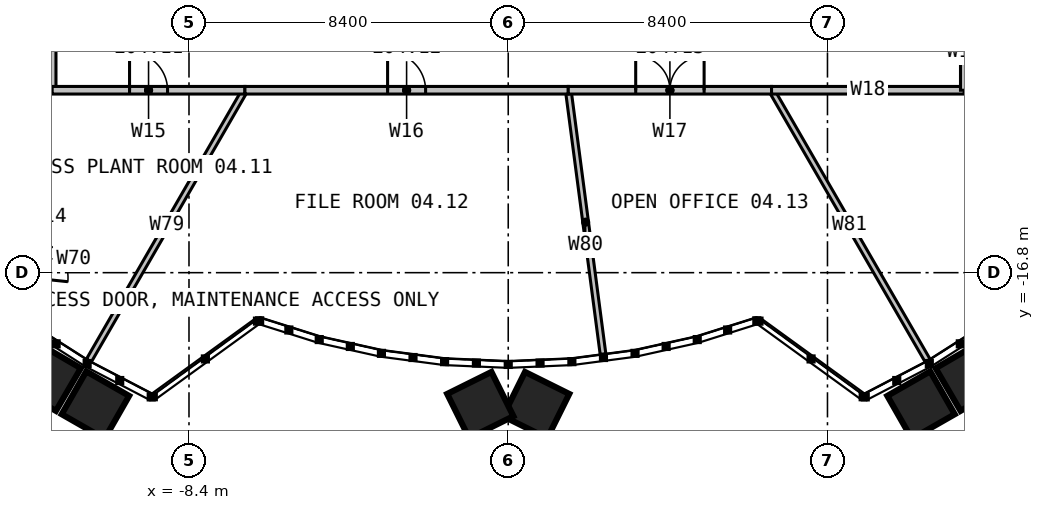
"""IFC4 building model, lengths in metres.
Left out: names, types, materials, properties, quantities, classifications, styles, units other than length and angle.
Written with IfcOpenShell. Run it as: python <this file> out.ifc"""

import sys

from ifc_helpers import new_model, si_unit, direction, frame, frame_2d, origin, place, context, subcontext, project, spatial, rectangle, extrude, element, fill, save


model = new_model("IFC4")
c1 = context("Model", 3, precision=1e-05, world=origin(), true_north=direction((0.0, 1.0)))
c2 = subcontext(c1, "Body", "Model", "MODEL_VIEW")
j1 = project(units=[si_unit("LENGTHUNIT", "METRE"), si_unit("PLANEANGLEUNIT", "RADIAN")], contexts=[c1])
p1 = place(None, origin())
s1 = spatial("IfcSite", under=j1, at=p1, CompositionType="ELEMENT")
p2 = place(p1, origin())
s2 = spatial("IfcBuilding", under=s1, at=p2, CompositionType="ELEMENT")
p3 = place(p2, frame((0.0, 0.0, 21.0)))
s3 = spatial("IfcBuildingStorey", under=s2, at=p3, CompositionType="ELEMENT", Elevation=21.0)
p4 = place(p3, frame((-12.0, -9.208, 0.0), z_axis=(0.0, 0.0, 1.0), x_axis=(-0.7933554916, -0.608758625359, 0.0)))
e1 = element("IfcWall", 1, at=p4, inside=s3, PredefinedType="PARTITIONING", context=c2, shape_type="SweptSolid", body=[
    extrude(rectangle(XDim=3.979, YDim=0.15, at=frame_2d((1.99, 0.0))), origin(), (0.0, 0.0, 1.0), 2.79),
])
p5 = place(p3, frame((-6.928, -12.0, 0.0), z_axis=(0.0, 0.0, 1.0), x_axis=(-0.499995243048, -0.866028150195, 0.0)))
e2 = element("IfcWall", 2, at=p5, inside=s3, PredefinedType="PARTITIONING", context=c2, shape_type="SweptSolid", body=[
    extrude(rectangle(XDim=8.212, YDim=0.15, at=frame_2d((4.106, 0.0))), origin(), (0.0, 0.0, 1.0), 2.79),
])
p6 = place(p3, frame((1.58, -12.0, 0.0), z_axis=(0.0, 0.0, 1.0), x_axis=(0.130512238579, -0.991446698306, 0.0)))
e3 = element("IfcWall", 3, at=p6, inside=s3, PredefinedType="PARTITIONING", context=c2, shape_type="SweptSolid", body=[
    extrude(rectangle(XDim=7.002, YDim=0.15, at=frame_2d((3.501, 0.0))), origin(), (0.0, 0.0, 1.0), 2.79),
])
p7 = place(p3, frame((6.928, -12.0, 0.0), z_axis=(0.0, 0.0, 1.0), x_axis=(0.499995243048, -0.866028150195, 0.0)))
e4 = element("IfcWall", 4, at=p7, inside=s3, PredefinedType="PARTITIONING", context=c2, shape_type="SweptSolid", body=[
    extrude(rectangle(XDim=8.212, YDim=0.15, at=frame_2d((4.106, 0.0))), origin(), (0.0, 0.0, 1.0), 2.79),
])
p8 = place(p3, frame((-12.0, -9.208, 0.0), z_axis=(0.0, 0.0, 1.0), x_axis=(0.0, -1.0, 0.0)))
e5 = element("IfcWall", 5, at=p8, inside=s3, PredefinedType="PARTITIONING", context=c2, shape_type="SweptSolid", body=[
    extrude(rectangle(XDim=2.792, YDim=0.2, at=frame_2d((1.396, 0.0))), origin(), (0.0, 0.0, 1.0), 3.8),
])
p9 = place(p3, frame((-12.0, -12.0, 0.0), z_axis=(0.0, 0.0, 1.0), x_axis=(1.0, 0.0, 0.0)))
e6 = element("IfcWall", 6, at=p9, inside=s3, PredefinedType="PARTITIONING", context=c2, shape_type="SweptSolid", body=[
    extrude(rectangle(XDim=5.072, YDim=0.2, at=frame_2d((2.536, 0.0))), origin(), (0.0, 0.0, 1.0), 3.8),
])
p10 = place(p9, frame((2.036, 0.0, 0.0)))
e7 = element("IfcOpeningElement", 7, at=p10, cuts=e6, PredefinedType="OPENING", context=c2, shape_type="SweptSolid", body=[
    extrude(rectangle(XDim=1.0, YDim=2.2, at=frame_2d((0.5, 1.1))), frame((0.0, 0.11, 0.0), z_axis=(0.0, -1.0, 0.0), x_axis=(1.0, 0.0, 0.0)), (0.0, 0.0, 1.0), 0.22),
])
p11 = place(p3, frame((-6.928, -12.0, 0.0), z_axis=(0.0, 0.0, 1.0), x_axis=(1.0, 0.0, 0.0)))
e8 = element("IfcWall", 8, at=p11, inside=s3, PredefinedType="PARTITIONING", context=c2, shape_type="SweptSolid", body=[
    extrude(rectangle(XDim=8.508, YDim=0.2, at=frame_2d((4.254, 0.0))), origin(), (0.0, 0.0, 1.0), 3.8),
])
p12 = place(p11, frame((3.754, 0.0, 0.0)))
e9 = element("IfcOpeningElement", 9, at=p12, cuts=e8, PredefinedType="OPENING", context=c2, shape_type="SweptSolid", body=[
    extrude(rectangle(XDim=1.0, YDim=2.2, at=frame_2d((0.5, 1.1))), frame((0.0, 0.11, 0.0), z_axis=(0.0, -1.0, 0.0), x_axis=(1.0, 0.0, 0.0)), (0.0, 0.0, 1.0), 0.22),
])
p13 = place(p3, frame((1.58, -12.0, 0.0), z_axis=(0.0, 0.0, 1.0), x_axis=(1.0, 0.0, 0.0)))
e10 = element("IfcWall", 10, at=p13, inside=s3, PredefinedType="PARTITIONING", context=c2, shape_type="SweptSolid", body=[
    extrude(rectangle(XDim=5.348, YDim=0.2, at=frame_2d((2.674, 0.0))), origin(), (0.0, 0.0, 1.0), 3.8),
])
p14 = place(p13, frame((1.774, 0.0, 0.0)))
e11 = element("IfcOpeningElement", 11, at=p14, cuts=e10, PredefinedType="OPENING", context=c2, shape_type="SweptSolid", body=[
    extrude(rectangle(XDim=1.8, YDim=2.2, at=frame_2d((0.9, 1.1))), frame((0.0, 0.11, 0.0), z_axis=(0.0, -1.0, 0.0), x_axis=(1.0, 0.0, 0.0)), (0.0, 0.0, 1.0), 0.22),
])
p15 = place(p3, frame((6.928, -12.0, 0.0), z_axis=(0.0, 0.0, 1.0), x_axis=(1.0, 0.0, 0.0)))
e12 = element("IfcWall", 12, at=p15, inside=s3, PredefinedType="PARTITIONING", context=c2, shape_type="SweptSolid", body=[
    extrude(rectangle(XDim=5.072, YDim=0.2, at=frame_2d((2.536, 0.0))), origin(), (0.0, 0.0, 1.0), 3.8),
])
p16 = place(p3, frame((12.0, -12.0, 0.0), z_axis=(0.0, 0.0, 1.0), x_axis=(0.0, 1.0, 0.0)))
e13 = element("IfcWall", 13, at=p16, inside=s3, PredefinedType="PARTITIONING", context=c2, shape_type="SweptSolid", body=[
    extrude(rectangle(XDim=2.0, YDim=0.2, at=frame_2d((1.0, 0.0))), origin(), (0.0, 0.0, 1.0), 3.8),
])
p17 = place(p10, origin())
e14 = element("IfcDoor", 14, at=p17, inside=s3, OperationType="SINGLE_SWING_LEFT", PredefinedType="DOOR", context=c2, shape_type="SweptSolid", body=[
    extrude(rectangle(XDim=1.0, YDim=2.2, at=frame_2d((0.5, 1.1))), frame((0.0, 0.025, 0.0), z_axis=(0.0, -1.0, 0.0), x_axis=(1.0, 0.0, 0.0)), (0.0, 0.0, 1.0), 0.05),
])
fill(e7, e14)
p18 = place(p12, origin())
e15 = element("IfcDoor", 15, at=p18, inside=s3, OperationType="SINGLE_SWING_LEFT", PredefinedType="DOOR", context=c2, shape_type="SweptSolid", body=[
    extrude(rectangle(XDim=1.0, YDim=2.2, at=frame_2d((0.5, 1.1))), frame((0.0, 0.025, 0.0), z_axis=(0.0, -1.0, 0.0), x_axis=(1.0, 0.0, 0.0)), (0.0, 0.0, 1.0), 0.05),
])
fill(e9, e15)
p19 = place(p14, origin())
e16 = element("IfcDoor", 16, at=p19, inside=s3, OperationType="DOUBLE_DOOR_SINGLE_SWING", PredefinedType="DOOR", context=c2, shape_type="SweptSolid", body=[
    extrude(rectangle(XDim=1.8, YDim=2.2, at=frame_2d((0.9, 1.1))), frame((0.0, 0.025, 0.0), z_axis=(0.0, -1.0, 0.0), x_axis=(1.0, 0.0, 0.0)), (0.0, 0.0, 1.0), 0.05),
])
fill(e11, e16)
save(model, sys.argv[1])
